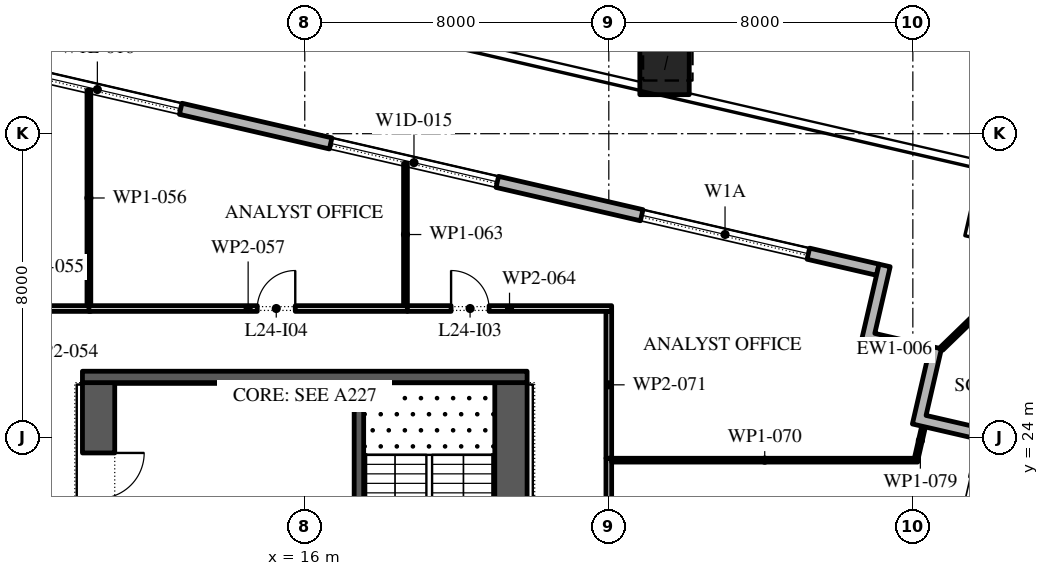
"""IFC4 building model, lengths in metres.
Left out: names, types, materials, properties, quantities, classifications, styles, units other than length and angle.
Written with IfcOpenShell. Run it as: python <this file> out.ifc"""

import sys

from ifc_helpers import new_model, si_unit, direction, frame, frame_2d, origin, origin_2d, place, context, subcontext, project, spatial, polyline, rectangle, outline, extrude, element, fill, save


model = new_model("IFC4")
c1 = context("Model", 3, precision=1e-05, world=origin(), true_north=direction((0.0, 1.0)))
c2 = subcontext(c1, "Body", "Model", "MODEL_VIEW")
j1 = project(units=[si_unit("LENGTHUNIT", "METRE"), si_unit("PLANEANGLEUNIT", "RADIAN")], contexts=[c1])
p1 = place(None, origin())
s1 = spatial("IfcSite", under=j1, at=p1, CompositionType="ELEMENT")
p2 = place(p1, origin())
s2 = spatial("IfcBuilding", under=s1, at=p2, CompositionType="ELEMENT")
p3 = place(p2, frame((0.0, 0.0, 114.0)))
s3 = spatial("IfcBuildingStorey", under=s2, at=p3, CompositionType="ELEMENT", Elevation=114.0)
p4 = place(p3, frame((25.466, 33.677, 0.0), z_axis=(0.020319626563, 0.088225387128, 0.995893264282), x_axis=(-0.974488096918, 0.224439187676, 0.0)))
e1 = element("IfcColumn", 1, at=p4, inside=s3, PredefinedType="COLUMN", context=c2, shape_type="SweptSolid", body=[
    extrude(rectangle(XDim=1.3, YDim=1.3, at=origin_2d()), origin(), (0.0, 0.0, 1.0), 4.217),
])
p5 = place(p3, frame((22.82, -24.016, 0.0), z_axis=(0.0, 0.0, 1.0), x_axis=(0.224953880882, 0.974369412223, 0.0)))
e2 = element("IfcWall", 2, at=p5, inside=s3, PredefinedType="STANDARD", context=c2, shape_type="SweptSolid", body=[
    extrude(rectangle(XDim=49.5, YDim=0.3, at=frame_2d((24.75, 0.0))), origin(), (0.0, 0.0, 1.0), 4.0),
])
p6 = place(p5, frame((1.157, 0.0, 0.45)))
e3 = element("IfcOpeningElement", 3, at=p6, cuts=e2, PredefinedType="OPENING", context=c2, shape_type="SweptSolid", body=[
    extrude(rectangle(XDim=4.5, YDim=3.05, at=frame_2d((2.25, 1.525))), frame((0.0, 0.16, 0.0), z_axis=(0.0, -1.0, 0.0), x_axis=(1.0, 0.0, 0.0)), (0.0, 0.0, 1.0), 0.32),
])
p7 = place(p5, frame((8.121, 0.0, 0.45)))
e4 = element("IfcOpeningElement", 4, at=p7, cuts=e2, PredefinedType="OPENING", context=c2, shape_type="SweptSolid", body=[
    extrude(rectangle(XDim=4.5, YDim=3.05, at=frame_2d((2.25, 1.525))), frame((0.0, 0.16, 0.0), z_axis=(0.0, -1.0, 0.0), x_axis=(1.0, 0.0, 0.0)), (0.0, 0.0, 1.0), 0.32),
])
p8 = place(p5, frame((15.236, 0.0, 0.45)))
e5 = element("IfcOpeningElement", 5, at=p8, cuts=e2, PredefinedType="OPENING", context=c2, shape_type="SweptSolid", body=[
    extrude(rectangle(XDim=4.5, YDim=3.05, at=frame_2d((2.25, 1.525))), frame((0.0, 0.16, 0.0), z_axis=(0.0, -1.0, 0.0), x_axis=(1.0, 0.0, 0.0)), (0.0, 0.0, 1.0), 0.32),
])
p9 = place(p5, frame((23.4, 0.0, 0.0)))
e6 = element("IfcOpeningElement", 6, at=p9, cuts=e2, PredefinedType="OPENING", context=c2, shape_type="SweptSolid", body=[
    extrude(rectangle(XDim=2.4, YDim=3.5, at=frame_2d((1.2, 1.75))), frame((0.0, 0.16, 0.0), z_axis=(0.0, -1.0, 0.0), x_axis=(1.0, 0.0, 0.0)), (0.0, 0.0, 1.0), 0.32),
])
p10 = place(p5, frame((29.464, 0.0, 0.45)))
e7 = element("IfcOpeningElement", 7, at=p10, cuts=e2, PredefinedType="OPENING", context=c2, shape_type="SweptSolid", body=[
    extrude(rectangle(XDim=4.5, YDim=2.875, at=frame_2d((2.25, 1.438))), frame((0.0, 0.16, 0.0), z_axis=(0.0, -1.0, 0.0), x_axis=(1.0, 0.0, 0.0)), (0.0, 0.0, 1.0), 0.32),
])
p11 = place(p5, frame((36.579, 0.0, 0.45)))
e8 = element("IfcOpeningElement", 8, at=p11, cuts=e2, PredefinedType="OPENING", context=c2, shape_type="SweptSolid", body=[
    extrude(rectangle(XDim=4.5, YDim=2.825, at=frame_2d((2.25, 1.413))), frame((0.0, 0.16, 0.0), z_axis=(0.0, -1.0, 0.0), x_axis=(1.0, 0.0, 0.0)), (0.0, 0.0, 1.0), 0.32),
])
p12 = place(p5, frame((43.693, 0.0, 0.45)))
e9 = element("IfcOpeningElement", 9, at=p12, cuts=e2, PredefinedType="OPENING", context=c2, shape_type="SweptSolid", body=[
    extrude(rectangle(XDim=4.5, YDim=2.75, at=frame_2d((2.25, 1.375))), frame((0.0, 0.16, 0.0), z_axis=(0.0, -1.0, 0.0), x_axis=(1.0, 0.0, 0.0)), (0.0, 0.0, 1.0), 0.32),
])
p13 = place(p3, frame((31.078, 28.421, 0.0), z_axis=(0.0, 0.0, 1.0), x_axis=(-0.974370456532, 0.224949357493, 0.0)))
e10 = element("IfcWall", 10, at=p13, inside=s3, PredefinedType="STANDARD", context=c2, shape_type="SweptSolid", body=[
    extrude(rectangle(XDim=51.0, YDim=0.3, at=frame_2d((25.5, 0.0))), origin(), (0.0, 0.0, 1.0), 4.0),
])
p14 = place(p13, frame((1.875, 0.0, 0.45)))
e11 = element("IfcOpeningElement", 11, at=p14, cuts=e10, PredefinedType="OPENING", context=c2, shape_type="SweptSolid", body=[
    extrude(rectangle(XDim=4.5, YDim=3.0, at=frame_2d((2.25, 1.5))), frame((0.0, 0.16, 0.0), z_axis=(0.0, -1.0, 0.0), x_axis=(1.0, 0.0, 0.0)), (0.0, 0.0, 1.0), 0.32),
])
p15 = place(p13, frame((10.275, 0.0, 0.45)))
e12 = element("IfcOpeningElement", 12, at=p15, cuts=e10, PredefinedType="OPENING", context=c2, shape_type="SweptSolid", body=[
    extrude(rectangle(XDim=4.5, YDim=2.875, at=frame_2d((2.25, 1.438))), frame((0.0, 0.16, 0.0), z_axis=(0.0, -1.0, 0.0), x_axis=(1.0, 0.0, 0.0)), (0.0, 0.0, 1.0), 0.32),
])
p16 = place(p13, frame((18.825, 0.0, 0.45)))
e13 = element("IfcOpeningElement", 13, at=p16, cuts=e10, PredefinedType="OPENING", context=c2, shape_type="SweptSolid", body=[
    extrude(rectangle(XDim=4.5, YDim=2.825, at=frame_2d((2.25, 1.413))), frame((0.0, 0.16, 0.0), z_axis=(0.0, -1.0, 0.0), x_axis=(1.0, 0.0, 0.0)), (0.0, 0.0, 1.0), 0.32),
])
p17 = place(p13, frame((27.075, 0.0, 0.0)))
e14 = element("IfcOpeningElement", 14, at=p17, cuts=e10, PredefinedType="OPENING", context=c2, shape_type="SweptSolid", body=[
    extrude(rectangle(XDim=2.4, YDim=3.2, at=frame_2d((1.2, 1.6))), frame((0.0, 0.16, 0.0), z_axis=(0.0, -1.0, 0.0), x_axis=(1.0, 0.0, 0.0)), (0.0, 0.0, 1.0), 0.32),
])
p18 = place(p13, frame((35.925, 0.0, 0.45)))
e15 = element("IfcOpeningElement", 15, at=p18, cuts=e10, PredefinedType="OPENING", context=c2, shape_type="SweptSolid", body=[
    extrude(rectangle(XDim=4.5, YDim=2.675, at=frame_2d((2.25, 1.337))), frame((0.0, 0.16, 0.0), z_axis=(0.0, -1.0, 0.0), x_axis=(1.0, 0.0, 0.0)), (0.0, 0.0, 1.0), 0.32),
])
p19 = place(p13, frame((44.475, 0.0, 0.45)))
e16 = element("IfcOpeningElement", 16, at=p19, cuts=e10, PredefinedType="OPENING", context=c2, shape_type="SweptSolid", body=[
    extrude(rectangle(XDim=4.5, YDim=3.05, at=frame_2d((2.25, 1.525))), frame((0.0, 0.16, 0.0), z_axis=(0.0, -1.0, 0.0), x_axis=(1.0, 0.0, 0.0)), (0.0, 0.0, 1.0), 0.32),
])
p20 = place(p3, origin())
e17 = element("IfcWall", 17, at=p20, inside=s3, PredefinedType="STANDARD", context=c2, shape_type="SweptSolid", body=[
    extrude(outline(polyline([(32.393, 26.116), (30.639, 26.521), (31.111, 28.567), (31.404, 28.5), (30.999, 26.746), (32.753, 26.341), (32.348, 24.587), (33.809, 24.25), (33.742, 23.957), (31.988, 24.362), (32.393, 26.116)])), origin(), (0.0, 0.0, 1.0), 4.0),
])
p21 = place(p3, frame((32.753, 26.341, -0.05), z_axis=(0.0, 0.0, 1.0), x_axis=(0.718177745075, 0.695859703158, 0.0)))
e18 = element("IfcWall", 18, at=p21, inside=s3, PredefinedType="STANDARD", context=c2, shape_type="SweptSolid", body=[
    extrude(rectangle(XDim=3.479, YDim=0.1, at=frame_2d((1.739, 0.0))), origin(), (0.0, 0.0, 1.0), 4.05),
])
p22 = place(p3, frame((21.425, -2.45, 0.0), z_axis=(0.0, 0.0, 1.0), x_axis=(0.0, 1.0, 0.0)))
e19 = element("IfcWall", 19, at=p22, inside=s3, PredefinedType="SHEAR", context=c2, shape_type="SweptSolid", body=[
    extrude(rectangle(XDim=27.9, YDim=0.85, at=frame_2d((13.95, 0.0))), origin(), (0.0, 0.0, 1.0), 4.0),
])
p23 = place(p22, frame((5.05, 0.0, 0.0)))
e20 = element("IfcOpeningElement", 20, at=p23, cuts=e19, PredefinedType="OPENING", context=c2, shape_type="SweptSolid", body=[
    extrude(rectangle(XDim=1.2, YDim=2.1, at=frame_2d((0.6, 1.05))), frame((0.0, 0.435, 0.0), z_axis=(0.0, -1.0, 0.0), x_axis=(1.0, 0.0, 0.0)), (0.0, 0.0, 1.0), 0.87),
])
p24 = place(p22, frame((21.65, 0.0, 0.0)))
e21 = element("IfcOpeningElement", 21, at=p24, cuts=e19, PredefinedType="OPENING", context=c2, shape_type="SweptSolid", body=[
    extrude(rectangle(XDim=1.2, YDim=2.1, at=frame_2d((0.6, 1.05))), frame((0.0, 0.435, 0.0), z_axis=(0.0, -1.0, 0.0), x_axis=(1.0, 0.0, 0.0)), (0.0, 0.0, 1.0), 0.87),
])
p25 = place(p3, frame((10.575, -2.45, 0.0), z_axis=(0.0, 0.0, 1.0), x_axis=(0.0, 1.0, 0.0)))
e22 = element("IfcWall", 22, at=p25, inside=s3, PredefinedType="SHEAR", context=c2, shape_type="SweptSolid", body=[
    extrude(rectangle(XDim=27.9, YDim=0.85, at=frame_2d((13.95, 0.0))), origin(), (0.0, 0.0, 1.0), 4.0),
])
p26 = place(p25, frame((23.65, 0.0, 0.0)))
e23 = element("IfcOpeningElement", 23, at=p26, cuts=e22, PredefinedType="OPENING", context=c2, shape_type="SweptSolid", body=[
    extrude(rectangle(XDim=2.4, YDim=2.1, at=frame_2d((1.2, 1.05))), frame((0.0, 0.435, 0.0), z_axis=(0.0, -1.0, 0.0), x_axis=(1.0, 0.0, 0.0)), (0.0, 0.0, 1.0), 0.87),
])
p27 = place(p25, frame((1.387, 0.0, 0.0)))
e24 = element("IfcOpeningElement", 24, at=p27, cuts=e22, PredefinedType="OPENING", context=c2, shape_type="SweptSolid", body=[
    extrude(rectangle(XDim=0.9, YDim=2.1, at=frame_2d((0.45, 1.05))), frame((0.0, 0.435, 0.0), z_axis=(0.0, -1.0, 0.0), x_axis=(1.0, 0.0, 0.0)), (0.0, 0.0, 1.0), 0.87),
])
p28 = place(p25, frame((4.562, 0.0, 0.0)))
e25 = element("IfcOpeningElement", 25, at=p28, cuts=e22, PredefinedType="OPENING", context=c2, shape_type="SweptSolid", body=[
    extrude(rectangle(XDim=1.0, YDim=2.1, at=frame_2d((0.5, 1.05))), frame((0.0, 0.435, 0.0), z_axis=(0.0, -1.0, 0.0), x_axis=(1.0, 0.0, 0.0)), (0.0, 0.0, 1.0), 0.87),
])
p29 = place(p3, frame((10.15, 25.6, 0.0), z_axis=(0.0, 0.0, 1.0), x_axis=(1.0, 0.0, 0.0)))
e26 = element("IfcWall", 26, at=p29, inside=s3, PredefinedType="SHEAR", context=c2, shape_type="SweptSolid", body=[
    extrude(rectangle(XDim=11.7, YDim=0.3, at=frame_2d((5.85, 0.0))), origin(), (0.0, 0.0, 1.0), 4.0),
])
p30 = place(p3, frame((17.425, 19.15, 0.0), z_axis=(0.0, 0.0, 1.0), x_axis=(0.0, 1.0, 0.0)))
e27 = element("IfcWall", 27, at=p30, inside=s3, PredefinedType="SHEAR", context=c2, shape_type="SweptSolid", body=[
    extrude(rectangle(XDim=6.3, YDim=0.25, at=frame_2d((3.15, 0.0))), origin(), (0.0, 0.0, 1.0), 4.0),
])
p31 = place(p30, frame((0.05, 0.0, 0.0)))
e28 = element("IfcOpeningElement", 28, at=p31, cuts=e27, PredefinedType="OPENING", context=c2, shape_type="SweptSolid", body=[
    extrude(rectangle(XDim=1.2, YDim=2.1, at=frame_2d((0.6, 1.05))), frame((0.0, 0.135, 0.0), z_axis=(0.0, -1.0, 0.0), x_axis=(1.0, 0.0, 0.0)), (0.0, 0.0, 1.0), 0.27),
])
p32 = place(p3, frame((8.075, 27.4, 0.0), z_axis=(0.0, 0.0, 1.0), x_axis=(1.0, 0.0, 0.0)))
e29 = element("IfcWall", 29, at=p32, inside=s3, PredefinedType="PARTITIONING", context=c2, shape_type="SweptSolid", body=[
    extrude(rectangle(XDim=2.295, YDim=0.15, at=frame_2d((1.147, 0.0))), origin(), (0.0, 0.0, 1.0), 4.0),
])
p33 = place(p3, frame((10.32, 27.475, 0.0), z_axis=(0.0, 0.0, 1.0), x_axis=(0.0, 1.0, 0.0)))
e30 = element("IfcWall", 30, at=p33, inside=s3, PredefinedType="PARTITIONING", context=c2, shape_type="SweptSolid", body=[
    extrude(rectangle(XDim=5.667, YDim=0.1, at=frame_2d((2.833, 0.0))), origin(), (0.0, 0.0, 1.0), 4.0),
])
p34 = place(p3, frame((10.32, 27.4, 0.0), z_axis=(0.0, 0.0, 1.0), x_axis=(1.0, 0.0, 0.0)))
e31 = element("IfcWall", 31, at=p34, inside=s3, PredefinedType="PARTITIONING", context=c2, shape_type="SweptSolid", body=[
    extrude(rectangle(XDim=8.38, YDim=0.15, at=frame_2d((4.19, 0.0))), origin(), (0.0, 0.0, 1.0), 4.0),
])
p35 = place(p34, frame((4.43, 0.0, 0.0)))
e32 = element("IfcOpeningElement", 32, at=p35, cuts=e31, PredefinedType="OPENING", context=c2, shape_type="SweptSolid", body=[
    extrude(rectangle(XDim=1.0, YDim=2.1, at=frame_2d((0.5, 1.05))), frame((0.0, 0.085, 0.0), z_axis=(0.0, -1.0, 0.0), x_axis=(1.0, 0.0, 0.0)), (0.0, 0.0, 1.0), 0.17),
])
p36 = place(p3, frame((18.65, 27.475, 0.0), z_axis=(0.0, 0.0, 1.0), x_axis=(0.0, 1.0, 0.0)))
e33 = element("IfcWall", 33, at=p36, inside=s3, PredefinedType="PARTITIONING", context=c2, shape_type="SweptSolid", body=[
    extrude(rectangle(XDim=3.744, YDim=0.1, at=frame_2d((1.872, 0.0))), origin(), (0.0, 0.0, 1.0), 4.0),
])
p37 = place(p3, frame((18.7, 27.4, 0.0), z_axis=(0.0, 0.0, 1.0), x_axis=(1.0, 0.0, 0.0)))
e34 = element("IfcWall", 34, at=p37, inside=s3, PredefinedType="PARTITIONING", context=c2, shape_type="SweptSolid", body=[
    extrude(rectangle(XDim=5.375, YDim=0.15, at=frame_2d((2.688, 0.0))), origin(), (0.0, 0.0, 1.0), 4.0),
])
p38 = place(p37, frame((1.15, 0.0, 0.0)))
e35 = element("IfcOpeningElement", 35, at=p38, cuts=e34, PredefinedType="OPENING", context=c2, shape_type="SweptSolid", body=[
    extrude(rectangle(XDim=1.0, YDim=2.1, at=frame_2d((0.5, 1.05))), frame((0.0, 0.085, 0.0), z_axis=(0.0, -1.0, 0.0), x_axis=(1.0, 0.0, 0.0)), (0.0, 0.0, 1.0), 0.17),
])
p39 = place(p3, frame((24.0, 23.46, 0.0), z_axis=(0.0, 0.0, 1.0), x_axis=(0.0, -1.0, 0.0)))
e36 = element("IfcWall", 36, at=p39, inside=s3, PredefinedType="PARTITIONING", context=c2, shape_type="SweptSolid", body=[
    extrude(rectangle(XDim=6.09, YDim=0.15, at=frame_2d((3.045, 0.0))), origin(), (0.0, 0.0, 1.0), 4.0),
])
p40 = place(p39, frame((2.49, 0.0, 0.0)))
e37 = element("IfcOpeningElement", 37, at=p40, cuts=e36, PredefinedType="OPENING", context=c2, shape_type="SweptSolid", body=[
    extrude(rectangle(XDim=1.0, YDim=2.1, at=frame_2d((0.5, 1.05))), frame((0.0, 0.085, 0.0), z_axis=(0.0, -1.0, 0.0), x_axis=(1.0, 0.0, 0.0)), (0.0, 0.0, 1.0), 0.17),
])
p41 = place(p3, frame((24.075, 23.41, 0.0), z_axis=(0.0, 0.0, 1.0), x_axis=(1.0, 0.0, 0.0)))
e38 = element("IfcWall", 38, at=p41, inside=s3, PredefinedType="PARTITIONING", context=c2, shape_type="SweptSolid", body=[
    extrude(rectangle(XDim=8.055, YDim=0.1, at=frame_2d((4.027, 0.0))), origin(), (0.0, 0.0, 1.0), 4.0),
])
p42 = place(p3, frame((24.0, 27.325, 0.0), z_axis=(0.0, 0.0, 1.0), x_axis=(0.0, -1.0, 0.0)))
e39 = element("IfcWall", 39, at=p42, inside=s3, PredefinedType="PARTITIONING", context=c2, shape_type="SweptSolid", body=[
    extrude(rectangle(XDim=3.865, YDim=0.15, at=frame_2d((1.933, 0.0))), origin(), (0.0, 0.0, 1.0), 4.0),
])
p43 = place(p3, frame((32.091, 23.459, 0.0), z_axis=(0.0, 0.0, 1.0), x_axis=(0.223406444343, 0.97472537703, 0.0)))
e40 = element("IfcWall", 40, at=p43, inside=s3, PredefinedType="PARTITIONING", context=c2, shape_type="SweptSolid", body=[
    extrude(rectangle(XDim=0.957, YDim=0.1, at=frame_2d((0.479, 0.0))), origin(), (0.0, 0.0, 1.0), 4.0),
])
p44 = place(p12, origin())
e41 = element("IfcWindow", 41, at=p44, inside=s3, PartitioningType="DOUBLE_PANEL_VERTICAL", PredefinedType="WINDOW", context=c2, shape_type="SweptSolid", body=[
    extrude(rectangle(XDim=4.5, YDim=2.75, at=frame_2d((2.25, 1.375))), frame((0.0, 0.03, 0.0), z_axis=(0.0, -1.0, 0.0), x_axis=(1.0, 0.0, 0.0)), (0.0, 0.0, 1.0), 0.06),
])
fill(e9, e41)
p45 = place(p14, origin())
e42 = element("IfcWindow", 42, at=p45, inside=s3, PartitioningType="DOUBLE_PANEL_VERTICAL", PredefinedType="WINDOW", context=c2, shape_type="SweptSolid", body=[
    extrude(rectangle(XDim=4.5, YDim=3.0, at=frame_2d((2.25, 1.5))), frame((0.0, 0.03, 0.0), z_axis=(0.0, -1.0, 0.0), x_axis=(1.0, 0.0, 0.0)), (0.0, 0.0, 1.0), 0.06),
])
fill(e11, e42)
p46 = place(p15, origin())
e43 = element("IfcWindow", 43, at=p46, inside=s3, PartitioningType="DOUBLE_PANEL_VERTICAL", PredefinedType="WINDOW", context=c2, shape_type="SweptSolid", body=[
    extrude(rectangle(XDim=4.5, YDim=2.875, at=frame_2d((2.25, 1.438))), frame((0.0, 0.03, 0.0), z_axis=(0.0, -1.0, 0.0), x_axis=(1.0, 0.0, 0.0)), (0.0, 0.0, 1.0), 0.06),
])
fill(e12, e43)
p47 = place(p16, origin())
e44 = element("IfcWindow", 44, at=p47, inside=s3, PartitioningType="DOUBLE_PANEL_VERTICAL", PredefinedType="WINDOW", context=c2, shape_type="SweptSolid", body=[
    extrude(rectangle(XDim=4.5, YDim=2.825, at=frame_2d((2.25, 1.413))), frame((0.0, 0.03, 0.0), z_axis=(0.0, -1.0, 0.0), x_axis=(1.0, 0.0, 0.0)), (0.0, 0.0, 1.0), 0.06),
])
fill(e13, e44)
p48 = place(p26, frame((2.4, 0.0, 0.0), z_axis=(0.0, 0.0, 1.0), x_axis=(-1.0, 0.0, 0.0)))
e45 = element("IfcDoor", 45, at=p48, inside=s3, OperationType="DOUBLE_DOOR_SINGLE_SWING", PredefinedType="DOOR", context=c2, shape_type="SweptSolid", body=[
    extrude(rectangle(XDim=2.4, YDim=2.1, at=frame_2d((1.2, 1.05))), frame((0.0, 0.025, 0.0), z_axis=(0.0, -1.0, 0.0), x_axis=(1.0, 0.0, 0.0)), (0.0, 0.0, 1.0), 0.05),
])
fill(e23, e45)
p49 = place(p38, origin())
e46 = element("IfcDoor", 46, at=p49, inside=s3, OperationType="SINGLE_SWING_RIGHT", PredefinedType="DOOR", context=c2, shape_type="SweptSolid", body=[
    extrude(rectangle(XDim=1.0, YDim=2.1, at=frame_2d((0.5, 1.05))), frame((0.0, 0.025, 0.0), z_axis=(0.0, -1.0, 0.0), x_axis=(1.0, 0.0, 0.0)), (0.0, 0.0, 1.0), 0.05),
])
fill(e35, e46)
p50 = place(p35, origin())
e47 = element("IfcDoor", 47, at=p50, inside=s3, OperationType="SINGLE_SWING_LEFT", PredefinedType="DOOR", context=c2, shape_type="SweptSolid", body=[
    extrude(rectangle(XDim=1.0, YDim=2.1, at=frame_2d((0.5, 1.05))), frame((0.0, 0.025, 0.0), z_axis=(0.0, -1.0, 0.0), x_axis=(1.0, 0.0, 0.0)), (0.0, 0.0, 1.0), 0.05),
])
fill(e32, e47)
save(model, sys.argv[1])
